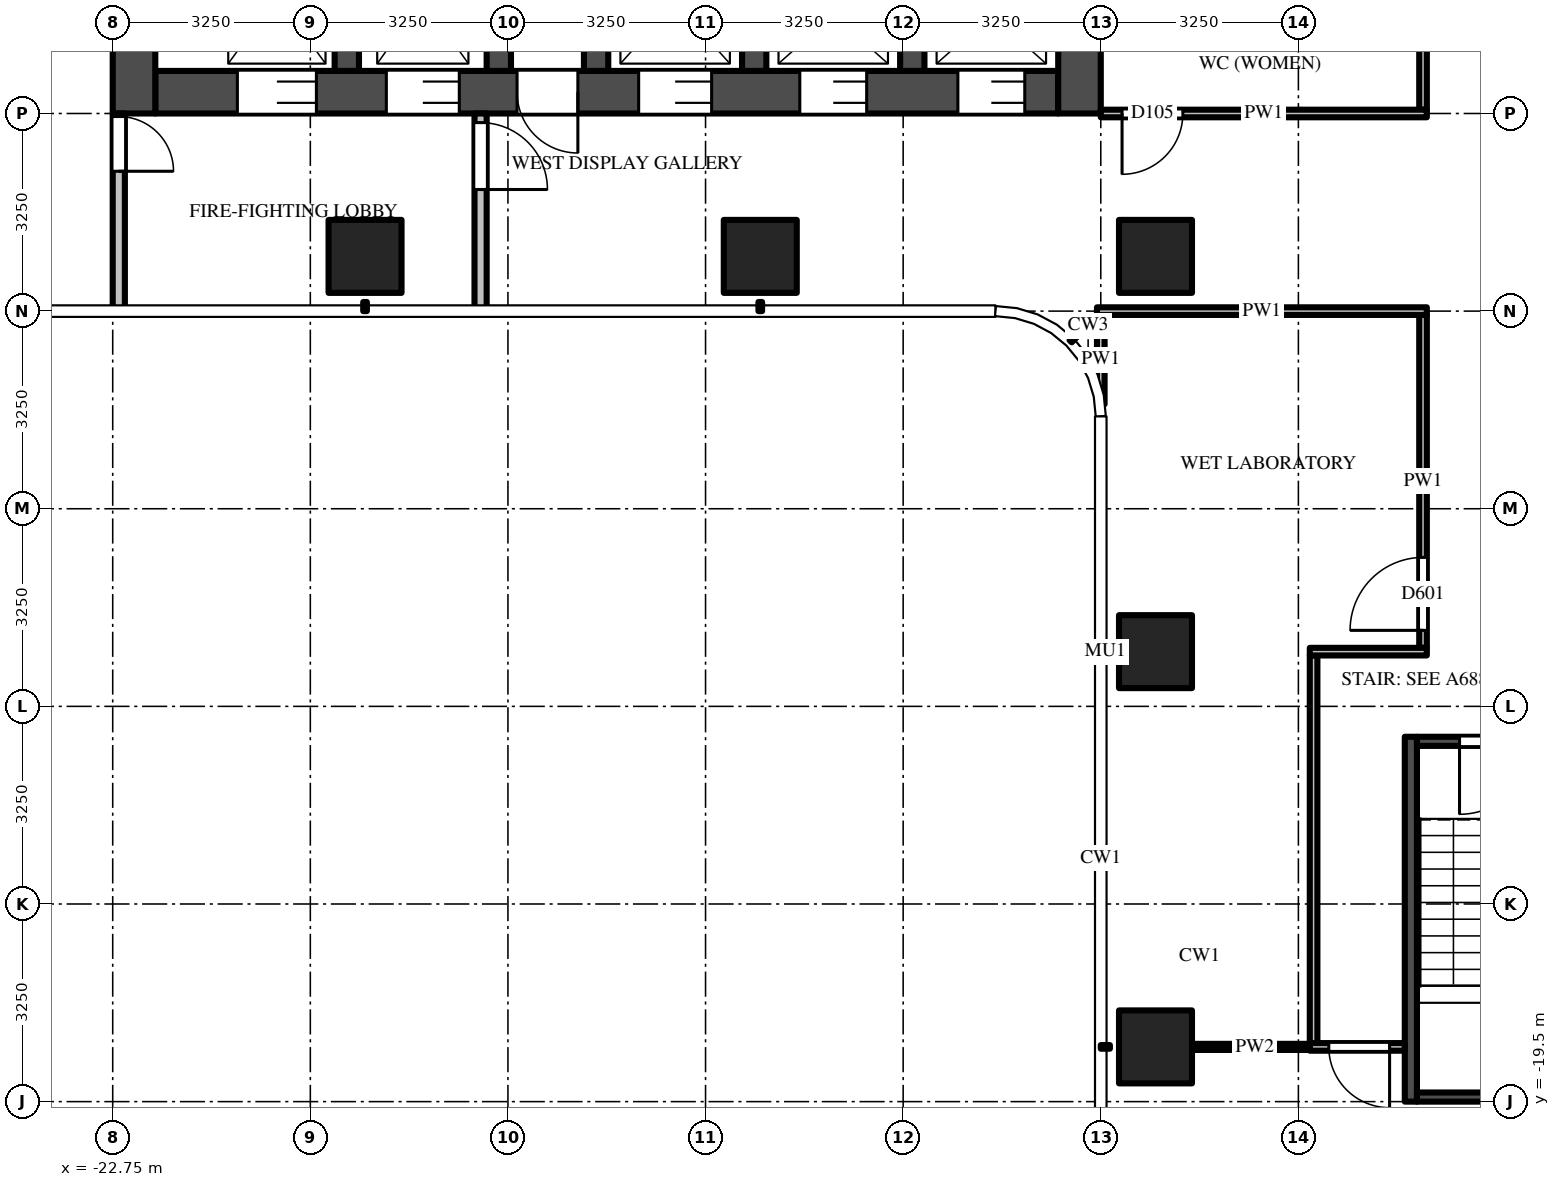
"""IFC4 building model, lengths in metres.
Left out: names, types, materials, properties, quantities, classifications, styles, units other than length and angle.
Written with IfcOpenShell. Run it as: python <this file> out.ifc"""

import sys

from ifc_helpers import new_model, si_unit, direction, frame, frame_2d, origin, origin_2d, place, context, subcontext, project, spatial, rectangle, extrude, source, transform, mapped, element, fill, save


model = new_model("IFC4")
c1 = context("Model", 3, precision=1e-05, world=origin(), true_north=direction((0.0, 1.0)))
c2 = subcontext(c1, "Body", "Model", "MODEL_VIEW")
j1 = project(units=[si_unit("LENGTHUNIT", "METRE"), si_unit("PLANEANGLEUNIT", "RADIAN")], contexts=[c1])
p1 = place(None, origin())
s1 = spatial("IfcSite", under=j1, at=p1, CompositionType="ELEMENT")
p2 = place(p1, origin())
s2 = spatial("IfcBuilding", under=s1, at=p2, CompositionType="ELEMENT")
p3 = place(p2, frame((0.0, 0.0, 197.1)))
s3 = spatial("IfcBuildingStorey", under=s2, at=p3, CompositionType="ELEMENT", Elevation=197.1)
m1 = source(origin(), c2, "Body", "SweptSolid", [
    extrude(rectangle(XDim=1.2, YDim=1.2, at=origin_2d()), origin(), (0.0, 0.0, 1.0), 3.9),
])
for number, where, z_axis, x_axis in (
    (1, (-5.6, -5.6, 0.0), (0.0, 0.0, 1.0), (1.0, 0.0, 0.0)),
    (2, (-5.6, -12.1, 0.0), (0.0, 0.0, 1.0), (1.0, 0.0, 0.0)),
    (3, (-5.6, -18.6, 0.0), (0.0, 0.0, 1.0), (1.0, 0.0, 0.0)),
    (4, (-12.1, -5.6, 0.0), (0.0, 0.0, 1.0), (1.0, 0.0, 0.0)),
    (5, (-18.6, -5.6, 0.0), (0.0, 0.0, 1.0), (1.0, 0.0, 0.0)),
):
    element("IfcColumn", number, at=place(p3, frame(where, z_axis=z_axis, x_axis=x_axis)), inside=s3, PredefinedType="COLUMN", context=c2, shape_type="MappedRepresentation", body=[
        mapped(m1, transform((0.0, 0.0, 0.0))),
    ])
m2 = source(origin(), c2, "Body", "SweptSolid", [
    extrude(rectangle(XDim=14.85, YDim=0.7, at=frame_2d((7.425, 0.0))), origin(), (0.0, 0.0, 1.0), 3.7),
])
p4 = place(p3, frame((-7.2, -2.9, 0.0), z_axis=(0.0, 0.0, 1.0), x_axis=(-1.0, 0.0, 0.0)))
e6 = element("IfcWall", 6, at=p4, inside=s3, PredefinedType="SHEAR", context=c2, shape_type="MappedRepresentation", body=[
    mapped(m2, transform((0.0, 0.0, 0.0))),
])
m3 = source(origin(), c2, "Body", "SweptSolid", [
    extrude(rectangle(XDim=1.1, YDim=2.1, at=frame_2d((0.55, 1.05))), frame((0.0, 0.36, 0.0), z_axis=(0.0, -1.0, 0.0), x_axis=(1.0, 0.0, 0.0)), (0.0, 0.0, 1.0), 0.72),
])
p5 = place(p4, frame((0.55, 0.0, 0.0)))
e7 = element("IfcOpeningElement", 7, at=p5, cuts=e6, PredefinedType="OPENING", context=c2, shape_type="MappedRepresentation", body=[
    mapped(m3, transform((0.0, 0.0, 0.0))),
])
p6 = place(p4, frame((3.15, 0.0, 0.0)))
e8 = element("IfcOpeningElement", 8, at=p6, cuts=e6, PredefinedType="OPENING", context=c2, shape_type="MappedRepresentation", body=[
    mapped(m3, transform((0.0, 0.0, 0.0))),
])
m4 = source(origin(), c2, "Body", "SweptSolid", [
    extrude(rectangle(XDim=1.2, YDim=2.1, at=frame_2d((0.6, 1.05))), frame((0.0, 0.36, 0.0), z_axis=(0.0, -1.0, 0.0), x_axis=(1.0, 0.0, 0.0)), (0.0, 0.0, 1.0), 0.72),
])
p7 = place(p4, frame((5.7, 0.0, 0.0)))
e9 = element("IfcOpeningElement", 9, at=p7, cuts=e6, PredefinedType="OPENING", context=c2, shape_type="MappedRepresentation", body=[
    mapped(m4, transform((0.0, 0.0, 0.0))),
])
m5 = source(origin(), c2, "Body", "SweptSolid", [
    extrude(rectangle(XDim=1.3, YDim=2.1, at=frame_2d((0.65, 1.05))), frame((0.0, 0.36, 0.0), z_axis=(0.0, -1.0, 0.0), x_axis=(1.0, 0.0, 0.0)), (0.0, 0.0, 1.0), 0.72),
])
p8 = place(p4, frame((12.2, 0.0, 0.0)))
e10 = element("IfcOpeningElement", 10, at=p8, cuts=e6, PredefinedType="OPENING", context=c2, shape_type="MappedRepresentation", body=[
    mapped(m5, transform((0.0, 0.0, 0.0))),
])
p9 = place(p4, frame((9.85, 0.0, 0.0)))
e11 = element("IfcOpeningElement", 11, at=p9, cuts=e6, PredefinedType="OPENING", context=c2, shape_type="MappedRepresentation", body=[
    mapped(m4, transform((0.0, 0.0, 0.0))),
])
m6 = source(origin(), c2, "Body", "SweptSolid", [
    extrude(rectangle(XDim=1.0, YDim=2.1, at=frame_2d((0.5, 1.05))), frame((0.0, 0.36, 0.0), z_axis=(0.0, -1.0, 0.0), x_axis=(1.0, 0.0, 0.0)), (0.0, 0.0, 1.0), 0.72),
])
p10 = place(p4, frame((7.9, 0.0, 0.0)))
e12 = element("IfcOpeningElement", 12, at=p10, cuts=e6, PredefinedType="OPENING", context=c2, shape_type="MappedRepresentation", body=[
    mapped(m6, transform((0.0, 0.0, 0.0))),
])
m7 = source(origin(), c2, "Body", "SweptSolid", [
    extrude(rectangle(XDim=9.05, YDim=0.7, at=frame_2d((4.525, 0.0))), origin(), (0.0, 0.0, 1.0), 3.7),
])
p11 = place(p3, frame((-6.85, 5.8, 0.0), z_axis=(0.0, 0.0, 1.0), x_axis=(0.0, -1.0, 0.0)))
e13 = element("IfcWall", 13, at=p11, inside=s3, PredefinedType="SHEAR", context=c2, shape_type="MappedRepresentation", body=[
    mapped(m7, transform((0.0, 0.0, 0.0))),
])
m8 = source(origin(), c2, "Body", "SweptSolid", [
    extrude(rectangle(XDim=1.8, YDim=2.1, at=frame_2d((0.9, 1.05))), frame((0.0, 0.36, 0.0), z_axis=(0.0, -1.0, 0.0), x_axis=(1.0, 0.0, 0.0)), (0.0, 0.0, 1.0), 0.72),
])
p12 = place(p11, frame((3.15, 0.0, 0.0)))
e14 = element("IfcOpeningElement", 14, at=p12, cuts=e13, PredefinedType="OPENING", context=c2, shape_type="MappedRepresentation", body=[
    mapped(m8, transform((0.0, 0.0, 0.0))),
])
p13 = place(p3, frame((-22.4, 5.8, 0.0), z_axis=(0.0, 0.0, 1.0), x_axis=(0.0, -1.0, 0.0)))
e15 = element("IfcWall", 15, at=p13, inside=s3, PredefinedType="SHEAR", context=c2, shape_type="MappedRepresentation", body=[
    mapped(m7, transform((0.0, 0.0, 0.0))),
])
m9 = source(origin(), c2, "Body", "SweptSolid", [
    extrude(rectangle(XDim=2.45, YDim=0.4, at=frame_2d((1.225, 0.0))), origin(), (0.0, 0.0, 1.0), 3.7),
])
for number, where, z_axis, x_axis in (
    (16, (-9.6, -0.1, 0.0), (0.0, 0.0, 1.0), (0.0, -1.0, 0.0)),
    (17, (-12.2, -0.1, 0.0), (0.0, 0.0, 1.0), (0.0, -1.0, 0.0)),
    (18, (-14.8, -0.1, 0.0), (0.0, 0.0, 1.0), (0.0, -1.0, 0.0)),
    (19, (-16.4, -0.1, 0.0), (0.0, 0.0, 1.0), (0.0, -1.0, 0.0)),
    (20, (-18.9, -0.1, 0.0), (0.0, 0.0, 1.0), (0.0, -1.0, 0.0)),
):
    element("IfcWall", number, at=place(p3, frame(where, z_axis=z_axis, x_axis=x_axis)), inside=s3, PredefinedType="SHEAR", context=c2, shape_type="MappedRepresentation", body=[
        mapped(m9, transform((0.0, 0.0, 0.0))),
    ])
m10 = source(origin(), c2, "Body", "SweptSolid", [
    extrude(rectangle(XDim=3.25, YDim=0.2, at=frame_2d((1.625, 0.0))), origin(), (0.0, 0.0, 1.0), 3.7),
])
p14 = place(p3, frame((-16.7, -3.25, 0.0), z_axis=(0.0, 0.0, 1.0), x_axis=(0.0, -1.0, 0.0)))
e21 = element("IfcWall", 21, at=p14, inside=s3, PredefinedType="PARTITIONING", context=c2, shape_type="MappedRepresentation", body=[
    mapped(m10, transform((0.0, 0.0, 0.0))),
])
m11 = source(origin(), c2, "Body", "SweptSolid", [
    extrude(rectangle(XDim=1.1, YDim=2.1, at=frame_2d((0.55, 1.05))), frame((0.0, 0.11, 0.0), z_axis=(0.0, -1.0, 0.0), x_axis=(1.0, 0.0, 0.0)), (0.0, 0.0, 1.0), 0.22),
])
p15 = place(p14, frame((0.15, 0.0, 0.0)))
e22 = element("IfcOpeningElement", 22, at=p15, cuts=e21, PredefinedType="OPENING", context=c2, shape_type="MappedRepresentation", body=[
    mapped(m11, transform((0.0, 0.0, 0.0))),
])
p16 = place(p3, frame((-22.65, -3.25, 0.0), z_axis=(0.0, 0.0, 1.0), x_axis=(0.0, -1.0, 0.0)))
e23 = element("IfcWall", 23, at=p16, inside=s3, PredefinedType="PARTITIONING", context=c2, shape_type="MappedRepresentation", body=[
    mapped(m10, transform((0.0, 0.0, 0.0))),
])
m12 = source(origin(), c2, "Body", "SweptSolid", [
    extrude(rectangle(XDim=0.9, YDim=2.1, at=frame_2d((0.45, 1.05))), frame((0.0, 0.11, 0.0), z_axis=(0.0, -1.0, 0.0), x_axis=(1.0, 0.0, 0.0)), (0.0, 0.0, 1.0), 0.22),
])
p17 = place(p16, frame((0.05, 0.0, 0.0)))
e24 = element("IfcOpeningElement", 24, at=p17, cuts=e23, PredefinedType="OPENING", context=c2, shape_type="MappedRepresentation", body=[
    mapped(m12, transform((0.0, 0.0, 0.0))),
])
m13 = source(origin(), c2, "Body", "SweptSolid", [
    extrude(rectangle(XDim=6.0, YDim=0.2, at=frame_2d((3.0, 0.0))), origin(), (0.0, 0.0, 1.0), 3.7),
])
p18 = place(p3, frame((-1.4, -13.5, 0.0), z_axis=(0.0, 0.0, 1.0), x_axis=(0.0, -1.0, 0.0)))
e25 = element("IfcWall", 25, at=p18, inside=s3, PredefinedType="SHEAR", context=c2, shape_type="MappedRepresentation", body=[
    mapped(m13, transform((0.0, 0.0, 0.0))),
])
m14 = source(origin(), c2, "Body", "SweptSolid", [
    extrude(rectangle(XDim=2.6, YDim=0.15, at=frame_2d((1.3, 0.0))), origin(), (0.0, 0.0, 1.0), 3.7),
])
p19 = place(p3, frame((1.3, -13.575, 0.0), z_axis=(0.0, 0.0, 1.0), x_axis=(-1.0, 0.0, 0.0)))
e26 = element("IfcWall", 26, at=p19, inside=s3, PredefinedType="SHEAR", context=c2, shape_type="MappedRepresentation", body=[
    mapped(m14, transform((0.0, 0.0, 0.0))),
])
m15 = source(origin(), c2, "Body", "SweptSolid", [
    extrude(rectangle(XDim=1.2, YDim=2.1, at=frame_2d((0.6, 1.05))), frame((0.0, 0.085, 0.0), z_axis=(0.0, -1.0, 0.0), x_axis=(1.0, 0.0, 0.0)), (0.0, 0.0, 1.0), 0.17),
])
p20 = place(p19, frame((0.7, 0.0, 0.0)))
e27 = element("IfcOpeningElement", 27, at=p20, cuts=e26, PredefinedType="OPENING", context=c2, shape_type="MappedRepresentation", body=[
    mapped(m15, transform((0.0, 0.0, 0.0))),
])
p21 = place(p3, frame((1.3, -19.425, 0.0), z_axis=(0.0, 0.0, 1.0), x_axis=(-1.0, 0.0, 0.0)))
e28 = element("IfcWall", 28, at=p21, inside=s3, PredefinedType="SHEAR", context=c2, shape_type="MappedRepresentation", body=[
    mapped(m14, transform((0.0, 0.0, 0.0))),
])
m16 = source(origin(), c2, "Body", "SweptSolid", [
    extrude(rectangle(XDim=1.469, YDim=0.125, at=frame_2d((0.734, 0.0))), origin(), (0.0, 0.0, 1.0), 3.7),
])
p22 = place(p3, frame((-6.5, -6.562, 0.0), z_axis=(0.0, 0.0, 1.0), x_axis=(0.0, -1.0, 0.0)))
e29 = element("IfcWall", 29, at=p22, inside=s3, PredefinedType="PARTITIONING", context=c2, shape_type="MappedRepresentation", body=[
    mapped(m16, transform((0.0, 0.0, 0.0))),
])
m17 = source(origin(), c2, "Body", "SweptSolid", [
    extrude(rectangle(XDim=6.387, YDim=0.125, at=frame_2d((3.194, 0.0))), origin(), (0.0, 0.0, 1.0), 2.997),
])
p23 = place(p3, frame((-3.0, -18.55, 0.0), z_axis=(0.0, 0.0, 1.0), x_axis=(0.0, 1.0, 0.0)))
e30 = element("IfcWall", 30, at=p23, inside=s3, PredefinedType="PARTITIONING", context=c2, shape_type="MappedRepresentation", body=[
    mapped(m17, transform((0.0, 0.0, 0.0))),
])
m18 = source(origin(), c2, "Body", "SweptSolid", [
    extrude(rectangle(XDim=3.125, YDim=0.125, at=frame_2d((1.562, 0.0))), origin(), (0.0, 0.0, 1.0), 3.068),
])
p24 = place(p3, frame((-1.2, -0.062, 0.0), z_axis=(0.0, 0.0, 1.0), x_axis=(0.0, -1.0, 0.0)))
e31 = element("IfcWall", 31, at=p24, inside=s3, PredefinedType="PARTITIONING", context=c2, shape_type="MappedRepresentation", body=[
    mapped(m18, transform((0.0, 0.0, 0.0))),
])
m19 = source(origin(), c2, "Body", "SweptSolid", [
    extrude(rectangle(XDim=5.475, YDim=0.125, at=frame_2d((2.738, 0.0))), origin(), (0.0, 0.0, 1.0), 2.997),
])
p25 = place(p3, frame((-1.2, -12.038, 0.0), z_axis=(0.0, 0.0, 1.0), x_axis=(0.0, 1.0, 0.0)))
e32 = element("IfcWall", 32, at=p25, inside=s3, PredefinedType="PARTITIONING", context=c2, shape_type="MappedRepresentation", body=[
    mapped(m19, transform((0.0, 0.0, 0.0))),
])
m20 = source(origin(), c2, "Body", "SweptSolid", [
    extrude(rectangle(XDim=1.2, YDim=2.1, at=frame_2d((0.6, 1.05))), frame((0.0, 0.073, 0.0), z_axis=(0.0, -1.0, 0.0), x_axis=(1.0, 0.0, 0.0)), (0.0, 0.0, 1.0), 0.145),
])
p26 = place(p25, frame((0.288, 0.0, 0.0)))
e33 = element("IfcOpeningElement", 33, at=p26, cuts=e32, PredefinedType="OPENING", context=c2, shape_type="MappedRepresentation", body=[
    mapped(m20, transform((0.0, 0.0, 0.0))),
])
m21 = source(origin(), c2, "Body", "SweptSolid", [
    extrude(rectangle(XDim=2.062, YDim=0.1, at=frame_2d((1.031, 0.0))), origin(), (0.0, 0.0, 1.0), 3.223),
])
p27 = place(p3, frame((-5.0, -18.6, 0.0), z_axis=(0.0, 0.0, 1.0), x_axis=(1.0, 0.0, 0.0)))
e34 = element("IfcWall", 34, at=p27, inside=s3, PredefinedType="PARTITIONING", context=c2, shape_type="MappedRepresentation", body=[
    mapped(m21, transform((0.0, 0.0, 0.0))),
])
m22 = source(origin(), c2, "Body", "SweptSolid", [
    extrude(rectangle(XDim=1.562, YDim=0.125, at=frame_2d((0.781, 0.0))), origin(), (0.0, 0.0, 1.0), 3.223),
])
p28 = place(p3, frame((-1.5, -18.6, 0.0), z_axis=(0.0, 0.0, 1.0), x_axis=(-1.0, 0.0, 0.0)))
e35 = element("IfcWall", 35, at=p28, inside=s3, PredefinedType="PARTITIONING", context=c2, shape_type="MappedRepresentation", body=[
    mapped(m22, transform((0.0, 0.0, 0.0))),
])
m23 = source(origin(), c2, "Body", "SweptSolid", [
    extrude(rectangle(XDim=1.0, YDim=2.1, at=frame_2d((0.5, 1.05))), frame((0.0, 0.073, 0.0), z_axis=(0.0, -1.0, 0.0), x_axis=(1.0, 0.0, 0.0)), (0.0, 0.0, 1.0), 0.145),
])
p29 = place(p28, frame((0.25, 0.0, 0.0)))
e36 = element("IfcOpeningElement", 36, at=p29, cuts=e35, PredefinedType="OPENING", context=c2, shape_type="MappedRepresentation", body=[
    mapped(m23, transform((0.0, 0.0, 0.0))),
])
m24 = source(origin(), c2, "Body", "SweptSolid", [
    extrude(rectangle(XDim=1.925, YDim=0.125, at=frame_2d((0.962, 0.0))), origin(), (0.0, 0.0, 1.0), 2.997),
])
p30 = place(p3, frame((-3.062, -12.1, 0.0), z_axis=(0.0, 0.0, 1.0), x_axis=(1.0, 0.0, 0.0)))
e37 = element("IfcWall", 37, at=p30, inside=s3, PredefinedType="PARTITIONING", context=c2, shape_type="MappedRepresentation", body=[
    mapped(m24, transform((0.0, 0.0, 0.0))),
])
m25 = source(origin(), c2, "Body", "SweptSolid", [
    extrude(rectangle(XDim=5.425, YDim=0.125, at=frame_2d((2.712, 0.0))), origin(), (0.0, 0.0, 1.0), 2.78),
])
p31 = place(p3, frame((-1.137, -6.5, 0.0), z_axis=(0.0, 0.0, 1.0), x_axis=(-1.0, 0.0, 0.0)))
e38 = element("IfcWall", 38, at=p31, inside=s3, PredefinedType="PARTITIONING", context=c2, shape_type="MappedRepresentation", body=[
    mapped(m25, transform((0.0, 0.0, 0.0))),
])
m26 = source(origin(), c2, "Body", "SweptSolid", [
    extrude(rectangle(XDim=5.363, YDim=0.125, at=frame_2d((2.681, 0.0))), origin(), (0.0, 0.0, 1.0), 2.997),
])
p32 = place(p3, frame((-1.137, -3.25, 0.0), z_axis=(0.0, 0.0, 1.0), x_axis=(-1.0, 0.0, 0.0)))
e39 = element("IfcWall", 39, at=p32, inside=s3, PredefinedType="PARTITIONING", context=c2, shape_type="MappedRepresentation", body=[
    mapped(m26, transform((0.0, 0.0, 0.0))),
])
p33 = place(p32, frame((4.012, 0.0, 0.0)))
e40 = element("IfcOpeningElement", 40, at=p33, cuts=e39, PredefinedType="OPENING", context=c2, shape_type="MappedRepresentation", body=[
    mapped(m23, transform((0.0, 0.0, 0.0))),
])
m27 = source(origin(), c2, "Body", "SweptSolid", [
    extrude(rectangle(XDim=1.1, YDim=2.1, at=frame_2d((0.55, 1.05))), frame((0.0, -0.275, 0.0), z_axis=(0.0, -1.0, 0.0), x_axis=(1.0, 0.0, 0.0)), (0.0, 0.0, 1.0), 0.05),
])
p34 = place(p5, origin())
e41 = element("IfcDoor", 41, at=p34, inside=s3, OperationType="DOUBLE_DOOR_SLIDING", PredefinedType="DOOR", context=c2, shape_type="MappedRepresentation", body=[
    mapped(m27, transform((0.0, 0.0, 0.0))),
])
fill(e7, e41)
p35 = place(p6, origin())
e42 = element("IfcDoor", 42, at=p35, inside=s3, OperationType="DOUBLE_DOOR_SLIDING", PredefinedType="DOOR", context=c2, shape_type="MappedRepresentation", body=[
    mapped(m27, transform((0.0, 0.0, 0.0))),
])
fill(e8, e42)
m28 = source(origin(), c2, "Body", "SweptSolid", [
    extrude(rectangle(XDim=1.2, YDim=2.1, at=frame_2d((0.6, 1.05))), frame((0.0, -0.275, 0.0), z_axis=(0.0, -1.0, 0.0), x_axis=(1.0, 0.0, 0.0)), (0.0, 0.0, 1.0), 0.05),
])
p36 = place(p7, origin())
e43 = element("IfcDoor", 43, at=p36, inside=s3, OperationType="DOUBLE_DOOR_SLIDING", PredefinedType="DOOR", context=c2, shape_type="MappedRepresentation", body=[
    mapped(m28, transform((0.0, 0.0, 0.0))),
])
fill(e9, e43)
m29 = source(origin(), c2, "Body", "SweptSolid", [
    extrude(rectangle(XDim=1.3, YDim=2.1, at=frame_2d((0.65, 1.05))), frame((0.0, -0.275, 0.0), z_axis=(0.0, -1.0, 0.0), x_axis=(1.0, 0.0, 0.0)), (0.0, 0.0, 1.0), 0.05),
])
p37 = place(p8, origin())
e44 = element("IfcDoor", 44, at=p37, inside=s3, OperationType="DOUBLE_DOOR_SLIDING", PredefinedType="DOOR", context=c2, shape_type="MappedRepresentation", body=[
    mapped(m29, transform((0.0, 0.0, 0.0))),
])
fill(e10, e44)
p38 = place(p9, origin())
e45 = element("IfcDoor", 45, at=p38, inside=s3, OperationType="DOUBLE_DOOR_SLIDING", PredefinedType="DOOR", context=c2, shape_type="MappedRepresentation", body=[
    mapped(m28, transform((0.0, 0.0, 0.0))),
])
fill(e11, e45)
m30 = source(origin(), c2, "Body", "SweptSolid", [
    extrude(rectangle(XDim=1.0, YDim=2.1, at=frame_2d((0.5, 1.05))), frame((0.0, -0.275, 0.0), z_axis=(0.0, -1.0, 0.0), x_axis=(1.0, 0.0, 0.0)), (0.0, 0.0, 1.0), 0.05),
])
p39 = place(p10, origin())
e46 = element("IfcDoor", 46, at=p39, inside=s3, OperationType="SINGLE_SWING_LEFT", PredefinedType="DOOR", context=c2, shape_type="MappedRepresentation", body=[
    mapped(m30, transform((0.0, 0.0, 0.0))),
])
fill(e12, e46)
m31 = source(origin(), c2, "Body", "SweptSolid", [
    extrude(rectangle(XDim=1.1, YDim=2.1, at=frame_2d((0.55, 1.05))), frame((0.0, 0.025, 0.0), z_axis=(0.0, -1.0, 0.0), x_axis=(1.0, 0.0, 0.0)), (0.0, 0.0, 1.0), 0.05),
])
p40 = place(p15, origin())
e47 = element("IfcDoor", 47, at=p40, inside=s3, OperationType="SINGLE_SWING_RIGHT", PredefinedType="DOOR", context=c2, shape_type="MappedRepresentation", body=[
    mapped(m31, transform((0.0, 0.0, 0.0))),
])
fill(e22, e47)
m32 = source(origin(), c2, "Body", "SweptSolid", [
    extrude(rectangle(XDim=0.9, YDim=2.1, at=frame_2d((0.45, 1.05))), frame((0.0, 0.025, 0.0), z_axis=(0.0, -1.0, 0.0), x_axis=(1.0, 0.0, 0.0)), (0.0, 0.0, 1.0), 0.05),
])
p41 = place(p17, origin())
e48 = element("IfcDoor", 48, at=p41, inside=s3, OperationType="SINGLE_SWING_RIGHT", PredefinedType="DOOR", context=c2, shape_type="MappedRepresentation", body=[
    mapped(m32, transform((0.0, 0.0, 0.0))),
])
fill(e24, e48)
m33 = source(origin(), c2, "Body", "SweptSolid", [
    extrude(rectangle(XDim=1.2, YDim=2.1, at=frame_2d((0.6, 1.05))), frame((0.0, 0.025, 0.0), z_axis=(0.0, -1.0, 0.0), x_axis=(1.0, 0.0, 0.0)), (0.0, 0.0, 1.0), 0.05),
])
p42 = place(p20, origin())
e49 = element("IfcDoor", 49, at=p42, inside=s3, OperationType="SINGLE_SWING_RIGHT", PredefinedType="DOOR", context=c2, shape_type="MappedRepresentation", body=[
    mapped(m33, transform((0.0, 0.0, 0.0))),
])
fill(e27, e49)
m34 = source(origin(), c2, "Body", "SweptSolid", [
    extrude(rectangle(XDim=1.0, YDim=2.1, at=frame_2d((0.5, 1.05))), frame((0.0, 0.025, 0.0), z_axis=(0.0, -1.0, 0.0), x_axis=(1.0, 0.0, 0.0)), (0.0, 0.0, 1.0), 0.05),
])
p43 = place(p29, origin())
e50 = element("IfcDoor", 50, at=p43, inside=s3, OperationType="SINGLE_SWING_LEFT", PredefinedType="DOOR", context=c2, shape_type="MappedRepresentation", body=[
    mapped(m34, transform((0.0, 0.0, 0.0))),
])
fill(e36, e50)
p44 = place(p26, origin())
e51 = element("IfcDoor", 51, at=p44, inside=s3, OperationType="SINGLE_SWING_LEFT", PredefinedType="DOOR", context=c2, shape_type="MappedRepresentation", body=[
    mapped(m33, transform((0.0, 0.0, 0.0))),
])
fill(e33, e51)
p45 = place(p33, origin())
e52 = element("IfcDoor", 52, at=p45, inside=s3, OperationType="SINGLE_SWING_RIGHT", PredefinedType="DOOR", context=c2, shape_type="MappedRepresentation", body=[
    mapped(m34, transform((0.0, 0.0, 0.0))),
])
fill(e40, e52)
save(model, sys.argv[1])
